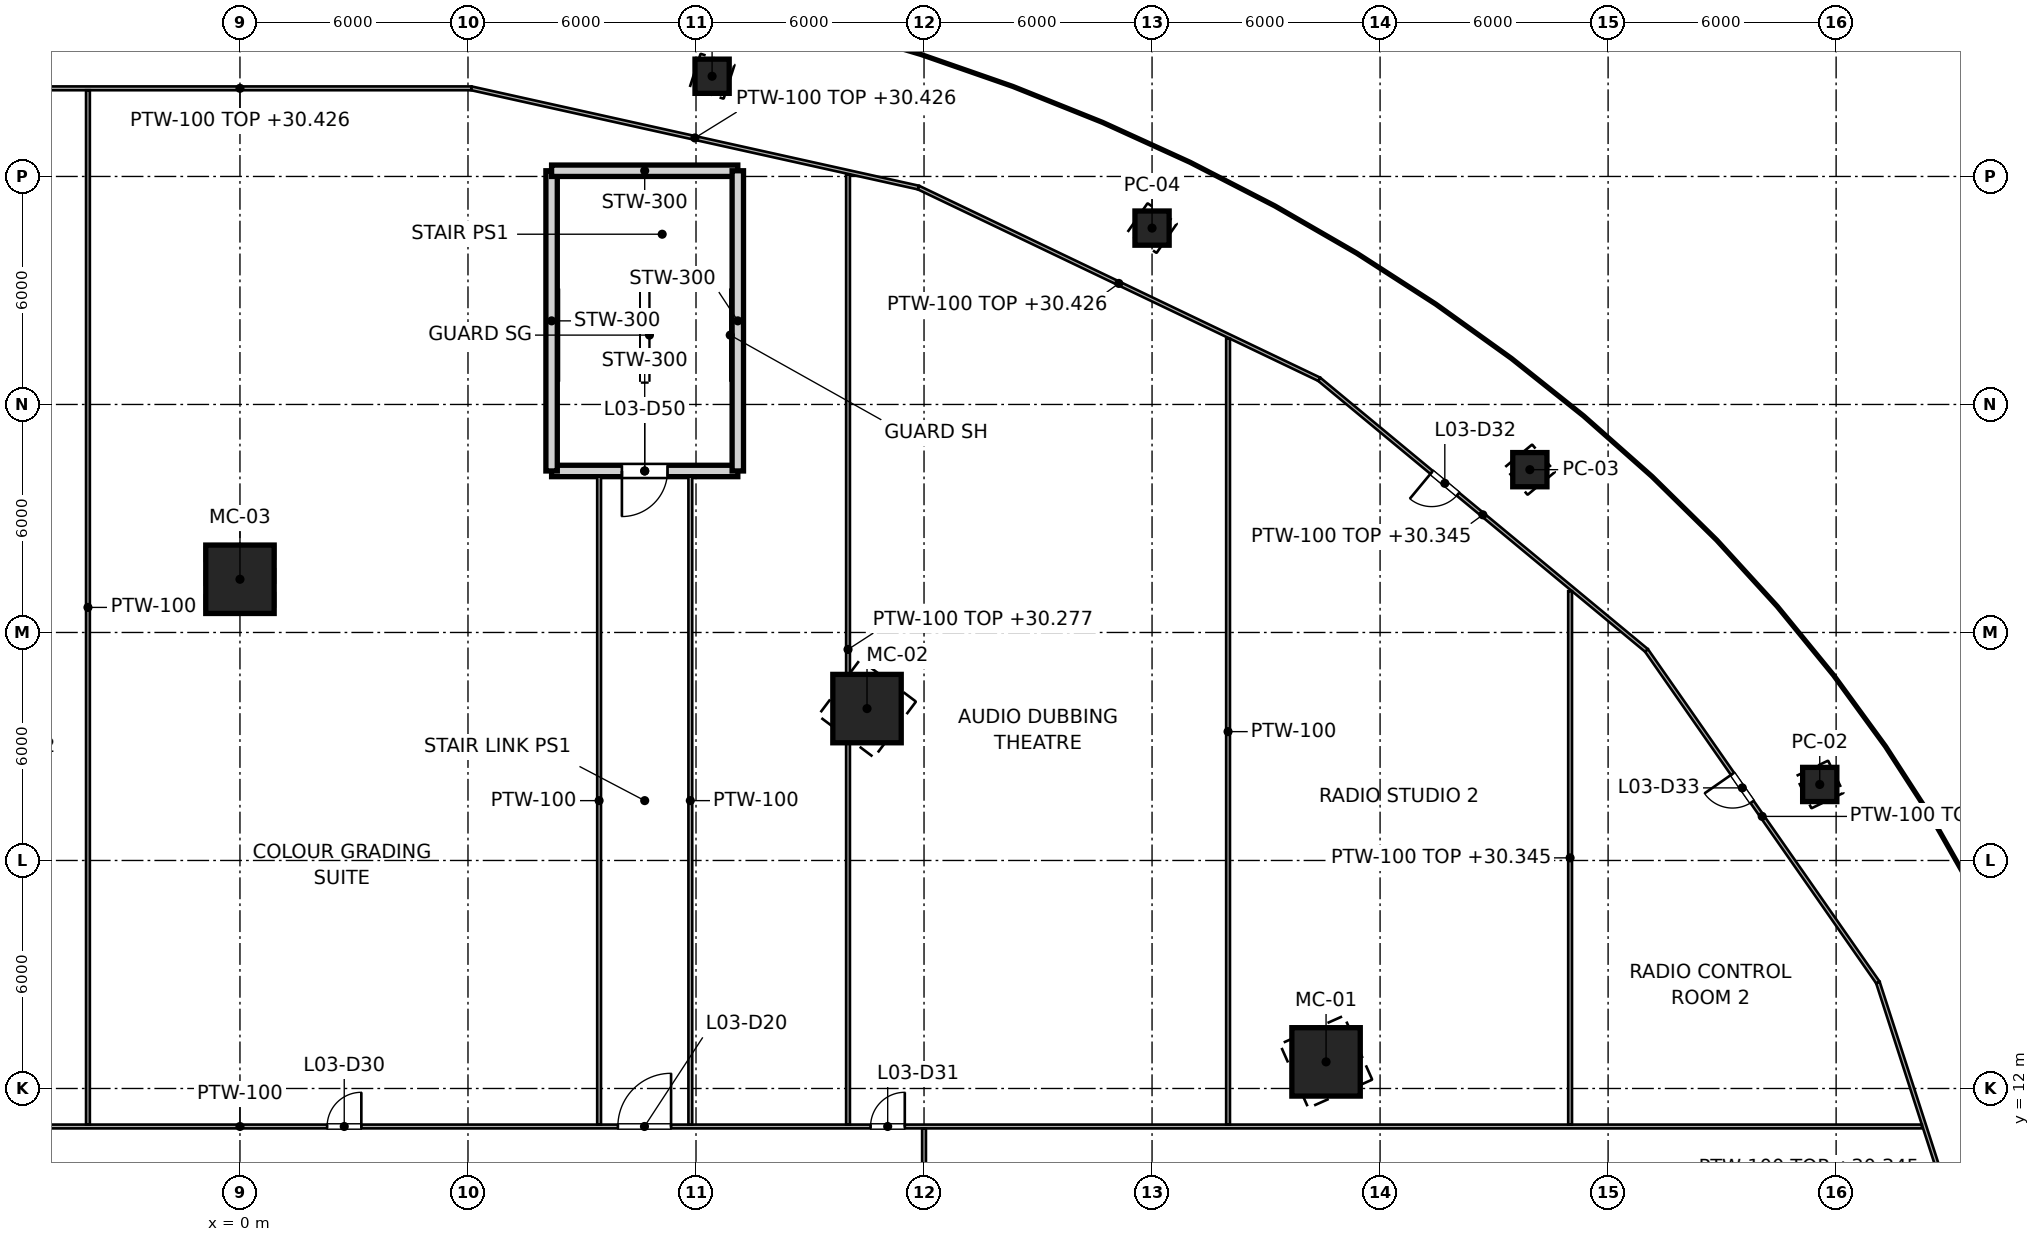
"""IFC4 building model, lengths in metres.
Left out: names, types, materials, properties, quantities, classifications, styles, units other than length and angle.
Written with IfcOpenShell. Run it as: python <this file> out.ifc"""

import sys

from ifc_helpers import new_model, si_unit, direction, frame, frame_2d, origin, origin_2d, place, context, subcontext, project, spatial, rectangle, hollow_rectangle, extrude, element, fill, save


model = new_model("IFC4")
c1 = context("Model", 3, precision=1e-05, world=origin(), true_north=direction((0.0, 1.0)))
c2 = subcontext(c1, "Body", "Model", "MODEL_VIEW")
j1 = project(units=[si_unit("LENGTHUNIT", "METRE"), si_unit("PLANEANGLEUNIT", "RADIAN")], contexts=[c1])
p1 = place(None, origin())
s1 = spatial("IfcSite", under=j1, at=p1, CompositionType="ELEMENT")
p2 = place(p1, origin())
s2 = spatial("IfcBuilding", under=s1, at=p2, CompositionType="ELEMENT")
p3 = place(p2, frame((0.0, 0.0, 26.0)))
s3 = spatial("IfcBuildingStorey", under=s2, at=p3, CompositionType="ELEMENT", Elevation=26.0)
for number, where, z_axis, x_axis in (
    (1, (28.579, 12.7, 0.0), (0.0, 0.0, 1.0), (0.914, 0.406, 0.0)),
    (2, (16.5, 21.997, 0.0), (0.0, 0.0, 1.0), (0.6, 0.8, 0.0)),
    (3, (0.0, 25.4, 0.0), (0.0, 0.0, 1.0), (0.0, 1.0, 0.0)),
):
    element("IfcColumn", number, at=place(p3, frame(where, z_axis=z_axis, x_axis=x_axis)), inside=s3, PredefinedType="COLUMN", context=c2, shape_type="SweptSolid", body=[
        extrude(hollow_rectangle(XDim=1.8, YDim=1.8, WallThickness=0.08, at=origin_2d()), origin(), (0.0, 0.0, 1.0), 5.4),
    ])
for number, where, z_axis, x_axis in (
    (4, (41.569, 20.0, 0.0), (0.0, 0.0, 1.0), (0.901, 0.434, 0.0)),
    (5, (33.941, 28.284, 0.0), (0.0, 0.0, 1.0), (0.768, 0.64, 0.0)),
    (6, (24.0, 34.641, 0.0), (0.0, 0.0, 1.0), (0.569, 0.822, 0.0)),
    (7, (12.423, 38.637, 0.0), (0.0, 0.0, 1.0), (0.306, 0.952, 0.0)),
):
    element("IfcColumn", number, at=place(p3, frame(where, z_axis=z_axis, x_axis=x_axis)), inside=s3, PredefinedType="COLUMN", context=c2, shape_type="SweptSolid", body=[
        extrude(hollow_rectangle(XDim=0.9, YDim=0.9, WallThickness=0.04, at=origin_2d()), origin(), (0.0, 0.0, 1.0), 5.4),
    ])
p4 = place(p3, frame((13.1, 28.25, 0.0), z_axis=(0.0, 0.0, 1.0), x_axis=(-1.0, 0.0, 0.0)))
e8 = element("IfcWall", 8, at=p4, inside=s3, PredefinedType="SOLIDWALL", context=c2, shape_type="SweptSolid", body=[
    extrude(rectangle(XDim=4.9, YDim=0.3, at=frame_2d((2.45, 0.0))), origin(), (0.0, 0.0, 1.0), 5.2),
])
p5 = place(p4, frame((1.85, 0.0, 0.0)))
e9 = element("IfcOpeningElement", 9, at=p5, cuts=e8, PredefinedType="OPENING", context=c2, shape_type="SweptSolid", body=[
    extrude(rectangle(XDim=1.2, YDim=2.1, at=frame_2d((0.6, 1.05))), frame((0.0, 0.15, 0.0), z_axis=(0.0, -1.0, 0.0), x_axis=(1.0, 0.0, 0.0)), (0.0, 0.0, 1.0), 0.3),
])
p6 = place(p3, frame((8.2, 28.25, 0.0), z_axis=(0.0, 0.0, 1.0), x_axis=(0.0, 1.0, 0.0)))
e10 = element("IfcWall", 10, at=p6, inside=s3, PredefinedType="SOLIDWALL", context=c2, shape_type="SweptSolid", body=[
    extrude(rectangle(XDim=7.9, YDim=0.3, at=frame_2d((3.95, 0.0))), origin(), (0.0, 0.0, 1.0), 5.2),
])
p7 = place(p3, frame((8.2, 36.15, 0.0), z_axis=(0.0, 0.0, 1.0), x_axis=(1.0, 0.0, 0.0)))
e11 = element("IfcWall", 11, at=p7, inside=s3, PredefinedType="SOLIDWALL", context=c2, shape_type="SweptSolid", body=[
    extrude(rectangle(XDim=4.9, YDim=0.3, at=frame_2d((2.45, 0.0))), origin(), (0.0, 0.0, 1.0), 5.2),
])
p8 = place(p3, frame((13.1, 36.15, 0.0), z_axis=(0.0, 0.0, 1.0), x_axis=(0.0, -1.0, 0.0)))
e12 = element("IfcWall", 12, at=p8, inside=s3, PredefinedType="SOLIDWALL", context=c2, shape_type="SweptSolid", body=[
    extrude(rectangle(XDim=7.9, YDim=0.3, at=frame_2d((3.95, 0.0))), origin(), (0.0, 0.0, 1.0), 5.2),
])
p9 = place(p3, frame((46.251, 5.045, 0.0), z_axis=(0.0, 0.0, 1.0), x_axis=(-0.307713034182, 0.951479210805, 0.0)))
e13 = element("IfcWall", 13, at=p9, inside=s3, PredefinedType="PARTITIONING", context=c2, shape_type="SweptSolid", body=[
    extrude(rectangle(XDim=10.243, YDim=0.1, at=frame_2d((5.122, 0.0))), origin(), (0.0, 0.0, 1.0), 4.345),
])
p10 = place(p9, frame((2.65, 0.0, 0.0)))
e14 = element("IfcOpeningElement", 14, at=p10, cuts=e13, PredefinedType="OPENING", context=c2, shape_type="SweptSolid", body=[
    extrude(rectangle(XDim=0.9, YDim=2.1, at=frame_2d((0.45, 1.05))), frame((0.0, 0.05, 0.0), z_axis=(0.0, -1.0, 0.0), x_axis=(1.0, 0.0, 0.0)), (0.0, 0.0, 1.0), 0.1),
])
p11 = place(p3, frame((43.099, 14.791, 0.0), z_axis=(0.0, 0.0, 1.0), x_axis=(-0.571737958261, 0.820436290692, 0.0)))
e15 = element("IfcWall", 15, at=p11, inside=s3, PredefinedType="PARTITIONING", context=c2, shape_type="SweptSolid", body=[
    extrude(rectangle(XDim=10.65, YDim=0.1, at=frame_2d((5.325, 0.0))), origin(), (0.0, 0.0, 1.0), 4.426),
])
p12 = place(p11, frame((5.79, 0.0, 0.0)))
e16 = element("IfcOpeningElement", 16, at=p12, cuts=e15, PredefinedType="OPENING", context=c2, shape_type="SweptSolid", body=[
    extrude(rectangle(XDim=0.9, YDim=2.1, at=frame_2d((0.45, 1.05))), frame((0.0, 0.05, 0.0), z_axis=(0.0, -1.0, 0.0), x_axis=(1.0, 0.0, 0.0)), (0.0, 0.0, 1.0), 0.1),
])
p13 = place(p3, frame((37.01, 23.529, 0.0), z_axis=(0.0, 0.0, 1.0), x_axis=(-0.770046995363, 0.637987166746, 0.0)))
e17 = element("IfcWall", 17, at=p13, inside=s3, PredefinedType="PARTITIONING", context=c2, shape_type="SweptSolid", body=[
    extrude(rectangle(XDim=11.183, YDim=0.1, at=frame_2d((5.591, 0.0))), origin(), (0.0, 0.0, 1.0), 4.345),
])
p14 = place(p13, frame((6.441, 0.0, 0.0)))
e18 = element("IfcOpeningElement", 18, at=p14, cuts=e17, PredefinedType="OPENING", context=c2, shape_type="SweptSolid", body=[
    extrude(rectangle(XDim=0.9, YDim=2.1, at=frame_2d((0.45, 1.05))), frame((0.0, 0.05, 0.0), z_axis=(0.0, -1.0, 0.0), x_axis=(1.0, 0.0, 0.0)), (0.0, 0.0, 1.0), 0.1),
])
p15 = place(p3, frame((28.399, 30.663, 0.0), z_axis=(0.0, 0.0, 1.0), x_axis=(-0.902100999032, 0.431524955878, 0.0)))
e19 = element("IfcWall", 19, at=p15, inside=s3, PredefinedType="PARTITIONING", context=c2, shape_type="SweptSolid", body=[
    extrude(rectangle(XDim=11.691, YDim=0.1, at=frame_2d((5.845, 0.0))), origin(), (0.0, 0.0, 1.0), 4.426),
])
p16 = place(p3, frame((17.852, 35.708, 0.0), z_axis=(0.0, 0.0, 1.0), x_axis=(-0.97623471049, 0.216715920124, 0.0)))
e20 = element("IfcWall", 20, at=p16, inside=s3, PredefinedType="PARTITIONING", context=c2, shape_type="SweptSolid", body=[
    extrude(rectangle(XDim=12.05, YDim=0.1, at=frame_2d((6.025, 0.0))), origin(), (0.0, 0.0, 1.0), 4.426),
])
p17 = place(p3, frame((6.089, 38.319, 0.0), z_axis=(0.0, 0.0, 1.0), x_axis=(-1.0, 0.0, 0.0)))
e21 = element("IfcWall", 21, at=p17, inside=s3, PredefinedType="PARTITIONING", context=c2, shape_type="SweptSolid", body=[
    extrude(rectangle(XDim=12.178, YDim=0.1, at=frame_2d((6.089, 0.0))), origin(), (0.0, 0.0, 1.0), 4.426),
])
p18 = place(p3, frame((-44.256, 11.0, 0.0), z_axis=(0.0, 0.0, 1.0), x_axis=(1.0, 0.0, 0.0)))
e22 = element("IfcWall", 22, at=p18, inside=s3, PredefinedType="PARTITIONING", context=c2, shape_type="SweptSolid", body=[
    extrude(rectangle(XDim=88.512, YDim=0.1, at=frame_2d((44.256, 0.0))), origin(), (0.0, 0.0, 1.0), 4.268),
])
p19 = place(p18, frame((54.2, 0.0, 0.0)))
e23 = element("IfcOpeningElement", 23, at=p19, cuts=e22, PredefinedType="OPENING", context=c2, shape_type="SweptSolid", body=[
    extrude(rectangle(XDim=1.4, YDim=2.1, at=frame_2d((0.7, 1.05))), frame((0.0, 0.05, 0.0), z_axis=(0.0, -1.0, 0.0), x_axis=(1.0, 0.0, 0.0)), (0.0, 0.0, 1.0), 0.1),
])
p20 = place(p18, frame((32.9, 0.0, 0.0)))
e24 = element("IfcOpeningElement", 24, at=p20, cuts=e22, PredefinedType="OPENING", context=c2, shape_type="SweptSolid", body=[
    extrude(rectangle(XDim=1.4, YDim=2.1, at=frame_2d((0.7, 1.05))), frame((0.0, 0.05, 0.0), z_axis=(0.0, -1.0, 0.0), x_axis=(1.0, 0.0, 0.0)), (0.0, 0.0, 1.0), 0.1),
])
p21 = place(p18, frame((29.15, 0.0, 0.0)))
e25 = element("IfcOpeningElement", 25, at=p21, cuts=e22, PredefinedType="OPENING", context=c2, shape_type="SweptSolid", body=[
    extrude(rectangle(XDim=0.9, YDim=2.1, at=frame_2d((0.45, 1.05))), frame((0.0, 0.05, 0.0), z_axis=(0.0, -1.0, 0.0), x_axis=(1.0, 0.0, 0.0)), (0.0, 0.0, 1.0), 0.1),
])
p22 = place(p18, frame((46.55, 0.0, 0.0)))
e26 = element("IfcOpeningElement", 26, at=p22, cuts=e22, PredefinedType="OPENING", context=c2, shape_type="SweptSolid", body=[
    extrude(rectangle(XDim=0.9, YDim=2.1, at=frame_2d((0.45, 1.05))), frame((0.0, 0.05, 0.0), z_axis=(0.0, -1.0, 0.0), x_axis=(1.0, 0.0, 0.0)), (0.0, 0.0, 1.0), 0.1),
])
p23 = place(p18, frame((60.85, 0.0, 0.0)))
e27 = element("IfcOpeningElement", 27, at=p23, cuts=e22, PredefinedType="OPENING", context=c2, shape_type="SweptSolid", body=[
    extrude(rectangle(XDim=0.9, YDim=2.1, at=frame_2d((0.45, 1.05))), frame((0.0, 0.05, 0.0), z_axis=(0.0, -1.0, 0.0), x_axis=(1.0, 0.0, 0.0)), (0.0, 0.0, 1.0), 0.1),
])
p24 = place(p3, frame((18.0, -10.95, 0.0), z_axis=(0.0, 0.0, 1.0), x_axis=(0.0, 1.0, 0.0)))
e28 = element("IfcWall", 28, at=p24, inside=s3, PredefinedType="PARTITIONING", context=c2, shape_type="SweptSolid", body=[
    extrude(rectangle(XDim=21.9, YDim=0.1, at=frame_2d((10.95, 0.0))), origin(), (0.0, 0.0, 1.0), 4.277),
])
p25 = place(p24, frame((10.25, 0.0, 0.0)))
e29 = element("IfcOpeningElement", 29, at=p25, cuts=e28, PredefinedType="OPENING", context=c2, shape_type="SweptSolid", body=[
    extrude(rectangle(XDim=1.4, YDim=2.1, at=frame_2d((0.7, 1.05))), frame((0.0, 0.05, 0.0), z_axis=(0.0, -1.0, 0.0), x_axis=(1.0, 0.0, 0.0)), (0.0, 0.0, 1.0), 0.1),
])
p26 = place(p24, frame((3.6, 0.0, 0.0)))
e30 = element("IfcOpeningElement", 30, at=p26, cuts=e28, PredefinedType="OPENING", context=c2, shape_type="SweptSolid", body=[
    extrude(rectangle(XDim=1.8, YDim=2.1, at=frame_2d((0.9, 1.05))), frame((0.0, 0.05, 0.0), z_axis=(0.0, -1.0, 0.0), x_axis=(1.0, 0.0, 0.0)), (0.0, 0.0, 1.0), 0.1),
])
p27 = place(p3, frame((-4.0, 11.05, 0.0), z_axis=(0.0, 0.0, 1.0), x_axis=(0.0, 1.0, 0.0)))
e31 = element("IfcWall", 31, at=p27, inside=s3, PredefinedType="PARTITIONING", context=c2, shape_type="SweptSolid", body=[
    extrude(rectangle(XDim=27.219, YDim=0.1, at=frame_2d((13.61, 0.0))), origin(), (0.0, 0.0, 1.0), 4.268),
])
p28 = place(p3, frame((16.0, 11.05, 0.0), z_axis=(0.0, 0.0, 1.0), x_axis=(0.0, 1.0, 0.0)))
e32 = element("IfcWall", 32, at=p28, inside=s3, PredefinedType="PARTITIONING", context=c2, shape_type="SweptSolid", body=[
    extrude(rectangle(XDim=25.007, YDim=0.1, at=frame_2d((12.503, 0.0))), origin(), (0.0, 0.0, 1.0), 4.277),
])
p29 = place(p3, frame((26.0, 11.05, 0.0), z_axis=(0.0, 0.0, 1.0), x_axis=(0.0, 1.0, 0.0)))
e33 = element("IfcWall", 33, at=p29, inside=s3, PredefinedType="PARTITIONING", context=c2, shape_type="SweptSolid", body=[
    extrude(rectangle(XDim=20.681, YDim=0.1, at=frame_2d((10.341, 0.0))), origin(), (0.0, 0.0, 1.0), 4.268),
])
p30 = place(p3, frame((35.0, 11.05, 0.0), z_axis=(0.0, 0.0, 1.0), x_axis=(0.0, 1.0, 0.0)))
e34 = element("IfcWall", 34, at=p30, inside=s3, PredefinedType="PARTITIONING", context=c2, shape_type="SweptSolid", body=[
    extrude(rectangle(XDim=14.037, YDim=0.1, at=frame_2d((7.019, 0.0))), origin(), (0.0, 0.0, 1.0), 4.345),
])
for number, where, z_axis, x_axis in (
    (35, (9.45, 11.05, 0.0), (0.0, 0.0, 1.0), (0.0, 1.0, 0.0)),
    (36, (11.85, 11.05, 0.0), (0.0, 0.0, 1.0), (0.0, 1.0, 0.0)),
):
    element("IfcWall", number, at=place(p3, frame(where, z_axis=z_axis, x_axis=x_axis)), inside=s3, PredefinedType="PARTITIONING", context=c2, shape_type="SweptSolid", body=[
        extrude(rectangle(XDim=17.05, YDim=0.1, at=frame_2d((8.525, 0.0))), origin(), (0.0, 0.0, 1.0), 4.268),
    ])
p31 = place(p19, origin())
e37 = element("IfcDoor", 37, at=p31, inside=s3, OperationType="SINGLE_SWING_RIGHT", PredefinedType="DOOR", context=c2, shape_type="SweptSolid", body=[
    extrude(rectangle(XDim=1.4, YDim=2.1, at=frame_2d((0.7, 1.05))), frame((0.0, 0.025, 0.0), z_axis=(0.0, -1.0, 0.0), x_axis=(1.0, 0.0, 0.0)), (0.0, 0.0, 1.0), 0.05),
])
fill(e23, e37)
p32 = place(p22, origin())
e38 = element("IfcDoor", 38, at=p32, inside=s3, OperationType="SINGLE_SWING_RIGHT", PredefinedType="DOOR", context=c2, shape_type="SweptSolid", body=[
    extrude(rectangle(XDim=0.9, YDim=2.1, at=frame_2d((0.45, 1.05))), frame((0.0, 0.025, 0.0), z_axis=(0.0, -1.0, 0.0), x_axis=(1.0, 0.0, 0.0)), (0.0, 0.0, 1.0), 0.05),
])
fill(e26, e38)
p33 = place(p23, origin())
e39 = element("IfcDoor", 39, at=p33, inside=s3, OperationType="SINGLE_SWING_RIGHT", PredefinedType="DOOR", context=c2, shape_type="SweptSolid", body=[
    extrude(rectangle(XDim=0.9, YDim=2.1, at=frame_2d((0.45, 1.05))), frame((0.0, 0.025, 0.0), z_axis=(0.0, -1.0, 0.0), x_axis=(1.0, 0.0, 0.0)), (0.0, 0.0, 1.0), 0.05),
])
fill(e27, e39)
p34 = place(p14, origin())
e40 = element("IfcDoor", 40, at=p34, inside=s3, OperationType="SINGLE_SWING_RIGHT", PredefinedType="DOOR", context=c2, shape_type="SweptSolid", body=[
    extrude(rectangle(XDim=0.9, YDim=2.1, at=frame_2d((0.45, 1.05))), frame((0.0, 0.025, 0.0), z_axis=(0.0, -1.0, 0.0), x_axis=(1.0, 0.0, 0.0)), (0.0, 0.0, 1.0), 0.05),
])
fill(e18, e40)
p35 = place(p12, origin())
e41 = element("IfcDoor", 41, at=p35, inside=s3, OperationType="SINGLE_SWING_RIGHT", PredefinedType="DOOR", context=c2, shape_type="SweptSolid", body=[
    extrude(rectangle(XDim=0.9, YDim=2.1, at=frame_2d((0.45, 1.05))), frame((0.0, 0.025, 0.0), z_axis=(0.0, -1.0, 0.0), x_axis=(1.0, 0.0, 0.0)), (0.0, 0.0, 1.0), 0.05),
])
fill(e16, e41)
p36 = place(p5, origin())
e42 = element("IfcDoor", 42, at=p36, inside=s3, OperationType="SINGLE_SWING_RIGHT", PredefinedType="DOOR", context=c2, shape_type="SweptSolid", body=[
    extrude(rectangle(XDim=1.2, YDim=2.1, at=frame_2d((0.6, 1.05))), frame((0.0, 0.025, 0.0), z_axis=(0.0, -1.0, 0.0), x_axis=(1.0, 0.0, 0.0)), (0.0, 0.0, 1.0), 0.05),
])
fill(e9, e42)
save(model, sys.argv[1])
